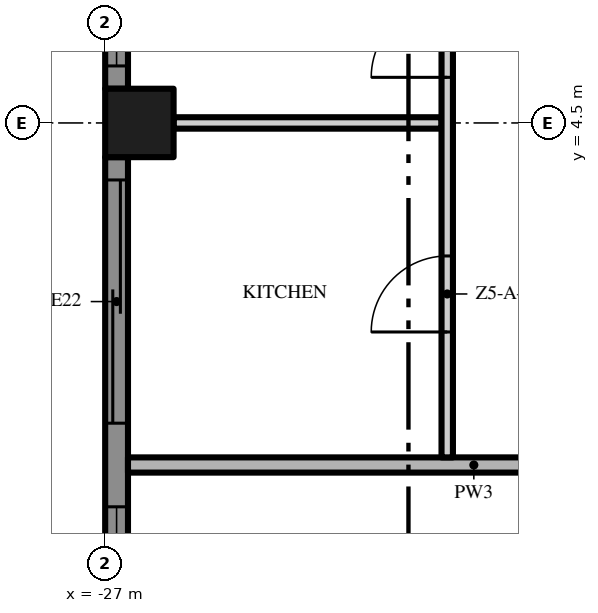
"""IFC4 building model, lengths in metres.
Left out: names, types, materials, properties, quantities, classifications, styles, units other than length and angle.
Written with IfcOpenShell. Run it as: python <this file> out.ifc"""

import sys

from ifc_helpers import new_model, si_unit, direction, frame, frame_2d, origin, origin_2d, place, context, subcontext, project, spatial, polyline, rectangle, outline, extrude, element, fill, save


model = new_model("IFC4")
c1 = context("Model", 3, precision=1e-05, world=origin(), true_north=direction((0.0, 1.0)))
c2 = subcontext(c1, "Body", "Model", "MODEL_VIEW")
j1 = project(units=[si_unit("LENGTHUNIT", "METRE"), si_unit("PLANEANGLEUNIT", "RADIAN")], contexts=[c1])
p1 = place(None, origin())
s1 = spatial("IfcSite", under=j1, at=p1, CompositionType="ELEMENT")
p2 = place(p1, origin())
s2 = spatial("IfcBuilding", under=s1, at=p2, CompositionType="ELEMENT")
p3 = place(p2, frame((0.0, 0.0, 246.4)))
s3 = spatial("IfcBuildingStorey", under=s2, at=p3, CompositionType="ELEMENT", Elevation=246.4)
p4 = place(p3, frame((-26.55, 4.5, 0.0), z_axis=(0.0, 0.0, 1.0), x_axis=(1.0, 0.0, 0.0)))
e1 = element("IfcColumn", 1, at=p4, inside=s3, PredefinedType="COLUMN", context=c2, shape_type="SweptSolid", body=[
    extrude(rectangle(XDim=0.9, YDim=0.9, at=origin_2d()), origin(), (0.0, 0.0, 1.0), 3.5),
])
p5 = place(p3, frame((-26.85, 4.95, 0.0), z_axis=(0.0, 0.0, 1.0), x_axis=(0.0, 1.0, 0.0)))
e2 = element("IfcWall", 2, at=p5, inside=s3, PredefinedType="SOLIDWALL", context=c2, shape_type="SweptSolid", body=[
    extrude(rectangle(XDim=8.1, YDim=0.3, at=frame_2d((4.05, 0.0))), origin(), (0.0, 0.0, 1.0), 3.5),
])
p6 = place(p5, frame((4.6, 0.0, 0.45)))
e3 = element("IfcOpeningElement", 3, at=p6, cuts=e2, PredefinedType="OPENING", context=c2, shape_type="SweptSolid", body=[
    extrude(rectangle(XDim=3.2, YDim=2.65, at=frame_2d((1.6, 1.325))), frame((0.0, 0.16, 0.0), z_axis=(0.0, -1.0, 0.0), x_axis=(1.0, 0.0, 0.0)), (0.0, 0.0, 1.0), 0.32),
])
p7 = place(p5, frame((0.3, 0.0, 0.45)))
e4 = element("IfcOpeningElement", 4, at=p7, cuts=e2, PredefinedType="OPENING", context=c2, shape_type="SweptSolid", body=[
    extrude(rectangle(XDim=3.2, YDim=2.65, at=frame_2d((1.6, 1.325))), frame((0.0, 0.16, 0.0), z_axis=(0.0, -1.0, 0.0), x_axis=(1.0, 0.0, 0.0)), (0.0, 0.0, 1.0), 0.32),
])
p8 = place(p3, frame((-26.85, -4.05, 0.0), z_axis=(0.0, 0.0, 1.0), x_axis=(0.0, 1.0, 0.0)))
e5 = element("IfcWall", 5, at=p8, inside=s3, PredefinedType="SOLIDWALL", context=c2, shape_type="SweptSolid", body=[
    extrude(rectangle(XDim=8.1, YDim=0.3, at=frame_2d((4.05, 0.0))), origin(), (0.0, 0.0, 1.0), 3.5),
])
p9 = place(p8, frame((4.6, 0.0, 0.0)))
e6 = element("IfcOpeningElement", 6, at=p9, cuts=e5, PredefinedType="OPENING", context=c2, shape_type="SweptSolid", body=[
    extrude(rectangle(XDim=3.2, YDim=2.4, at=frame_2d((1.6, 1.2))), frame((0.0, 0.16, 0.0), z_axis=(0.0, -1.0, 0.0), x_axis=(1.0, 0.0, 0.0)), (0.0, 0.0, 1.0), 0.32),
])
p10 = place(p8, frame((0.3, 0.0, 0.45)))
e7 = element("IfcOpeningElement", 7, at=p10, cuts=e5, PredefinedType="OPENING", context=c2, shape_type="SweptSolid", body=[
    extrude(rectangle(XDim=3.2, YDim=2.65, at=frame_2d((1.6, 1.325))), frame((0.0, 0.16, 0.0), z_axis=(0.0, -1.0, 0.0), x_axis=(1.0, 0.0, 0.0)), (0.0, 0.0, 1.0), 0.32),
])
p11 = place(p3, origin())
e8 = element("IfcWall", 8, at=p11, inside=s3, PredefinedType="USERDEFINED", context=c2, shape_type="SweptSolid", body=[
    extrude(outline(polyline([(-29.649, 18.0), (-29.985, 16.5), (-30.0, 16.125), (-29.869, 15.0), (-29.345, 13.5), (-28.612, 12.0), (-27.951, 10.5), (-27.615, 9.0), (-27.6, 8.625), (-27.731, 7.5), (-28.255, 6.0), (-28.988, 4.5), (-29.649, 3.0), (-29.985, 1.5), (-30.0, 1.125), (-29.869, 0.0), (-29.345, -1.5), (-28.612, -3.0), (-27.951, -4.5), (-27.615, -6.0), (-27.6, -6.375), (-27.731, -7.5), (-28.255, -9.0), (-28.988, -10.5), (-29.649, -12.0), (-29.985, -13.5), (-30.0, -13.875), (-29.869, -15.0), (-29.345, -16.5), (-28.612, -18.0), (-28.388, -17.89), (-29.114, -16.404), (-29.624, -14.944), (-29.749, -13.865), (-29.736, -13.533), (-29.41, -12.079), (-28.761, -10.605), (-28.024, -9.096), (-27.486, -7.556), (-27.349, -6.385), (-27.366, -5.967), (-27.713, -4.421), (-28.385, -2.895), (-29.114, -1.404), (-29.624, 0.056), (-29.749, 1.135), (-29.736, 1.467), (-29.41, 2.921), (-28.761, 4.395), (-28.024, 5.904), (-27.486, 7.444), (-27.349, 8.615), (-27.366, 9.033), (-27.713, 10.579), (-28.385, 12.105), (-29.114, 13.596), (-29.624, 15.056), (-29.749, 16.135), (-29.736, 16.467), (-29.405, 17.945), (-29.649, 18.0)])), origin(), (0.0, 0.0, 1.0), 0.9),
])
p12 = place(p3, frame((-26.7, 0.0, 0.0), z_axis=(0.0, 0.0, 1.0), x_axis=(1.0, 0.0, 0.0)))
e9 = element("IfcWall", 9, at=p12, inside=s3, PredefinedType="PARTITIONING", context=c2, shape_type="SweptSolid", body=[
    extrude(rectangle(XDim=9.1, YDim=0.2, at=frame_2d((4.55, 0.0))), origin(), (0.0, 0.0, 1.0), 3.5),
])
p13 = place(p3, frame((-26.1, 4.5, 0.0), z_axis=(0.0, 0.0, 1.0), x_axis=(1.0, 0.0, 0.0)))
e10 = element("IfcWall", 10, at=p13, inside=s3, PredefinedType="PARTITIONING", context=c2, shape_type="SweptSolid", body=[
    extrude(rectangle(XDim=3.525, YDim=0.15, at=frame_2d((1.762, 0.0))), origin(), (0.0, 0.0, 1.0), 3.5),
])
p14 = place(p3, frame((-22.5, 0.1, 0.0), z_axis=(0.0, 0.0, 1.0), x_axis=(0.0, 1.0, 0.0)))
e11 = element("IfcWall", 11, at=p14, inside=s3, PredefinedType="PARTITIONING", context=c2, shape_type="SweptSolid", body=[
    extrude(rectangle(XDim=17.45, YDim=0.15, at=frame_2d((8.725, 0.0))), origin(), (0.0, 0.0, 1.0), 3.5),
])
p15 = place(p14, frame((1.65, 0.0, 0.0)))
e12 = element("IfcOpeningElement", 12, at=p15, cuts=e11, PredefinedType="OPENING", context=c2, shape_type="SweptSolid", body=[
    extrude(rectangle(XDim=1.0, YDim=2.4, at=frame_2d((0.5, 1.2))), frame((0.0, 0.085, 0.0), z_axis=(0.0, -1.0, 0.0), x_axis=(1.0, 0.0, 0.0)), (0.0, 0.0, 1.0), 0.17),
])
p16 = place(p14, frame((5.0, 0.0, 0.0)))
e13 = element("IfcOpeningElement", 13, at=p16, cuts=e11, PredefinedType="OPENING", context=c2, shape_type="SweptSolid", body=[
    extrude(rectangle(XDim=1.0, YDim=2.4, at=frame_2d((0.5, 1.2))), frame((0.0, 0.085, 0.0), z_axis=(0.0, -1.0, 0.0), x_axis=(1.0, 0.0, 0.0)), (0.0, 0.0, 1.0), 0.17),
])
p17 = place(p14, frame((11.4, 0.0, 0.0)))
e14 = element("IfcOpeningElement", 14, at=p17, cuts=e11, PredefinedType="OPENING", context=c2, shape_type="SweptSolid", body=[
    extrude(rectangle(XDim=1.8, YDim=2.4, at=frame_2d((0.9, 1.2))), frame((0.0, 0.085, 0.0), z_axis=(0.0, -1.0, 0.0), x_axis=(1.0, 0.0, 0.0)), (0.0, 0.0, 1.0), 0.17),
])
p18 = place(p7, origin())
e15 = element("IfcWindow", 15, at=p18, inside=s3, PartitioningType="SINGLE_PANEL", PredefinedType="WINDOW", context=c2, shape_type="SweptSolid", body=[
    extrude(rectangle(XDim=3.2, YDim=2.65, at=frame_2d((1.6, 1.325))), frame((0.0, 0.03, 0.0), z_axis=(0.0, -1.0, 0.0), x_axis=(1.0, 0.0, 0.0)), (0.0, 0.0, 1.0), 0.06),
])
fill(e4, e15)
p19 = place(p9, origin())
e16 = element("IfcDoor", 16, at=p19, inside=s3, OperationType="SINGLE_SWING_LEFT", PredefinedType="DOOR", context=c2, shape_type="SweptSolid", body=[
    extrude(rectangle(XDim=3.2, YDim=2.4, at=frame_2d((1.6, 1.2))), frame((0.0, 0.025, 0.0), z_axis=(0.0, -1.0, 0.0), x_axis=(1.0, 0.0, 0.0)), (0.0, 0.0, 1.0), 0.05),
])
fill(e6, e16)
p20 = place(p10, origin())
e17 = element("IfcWindow", 17, at=p20, inside=s3, PartitioningType="SINGLE_PANEL", PredefinedType="WINDOW", context=c2, shape_type="SweptSolid", body=[
    extrude(rectangle(XDim=3.2, YDim=2.65, at=frame_2d((1.6, 1.325))), frame((0.0, 0.03, 0.0), z_axis=(0.0, -1.0, 0.0), x_axis=(1.0, 0.0, 0.0)), (0.0, 0.0, 1.0), 0.06),
])
fill(e7, e17)
p21 = place(p15, origin())
e18 = element("IfcDoor", 18, at=p21, inside=s3, OperationType="SINGLE_SWING_LEFT", PredefinedType="DOOR", context=c2, shape_type="SweptSolid", body=[
    extrude(rectangle(XDim=1.0, YDim=2.4, at=frame_2d((0.5, 1.2))), frame((0.0, 0.025, 0.0), z_axis=(0.0, -1.0, 0.0), x_axis=(1.0, 0.0, 0.0)), (0.0, 0.0, 1.0), 0.05),
])
fill(e12, e18)
p22 = place(p16, origin())
e19 = element("IfcDoor", 19, at=p22, inside=s3, OperationType="SINGLE_SWING_LEFT", PredefinedType="DOOR", context=c2, shape_type="SweptSolid", body=[
    extrude(rectangle(XDim=1.0, YDim=2.4, at=frame_2d((0.5, 1.2))), frame((0.0, 0.025, 0.0), z_axis=(0.0, -1.0, 0.0), x_axis=(1.0, 0.0, 0.0)), (0.0, 0.0, 1.0), 0.05),
])
fill(e13, e19)
save(model, sys.argv[1])
